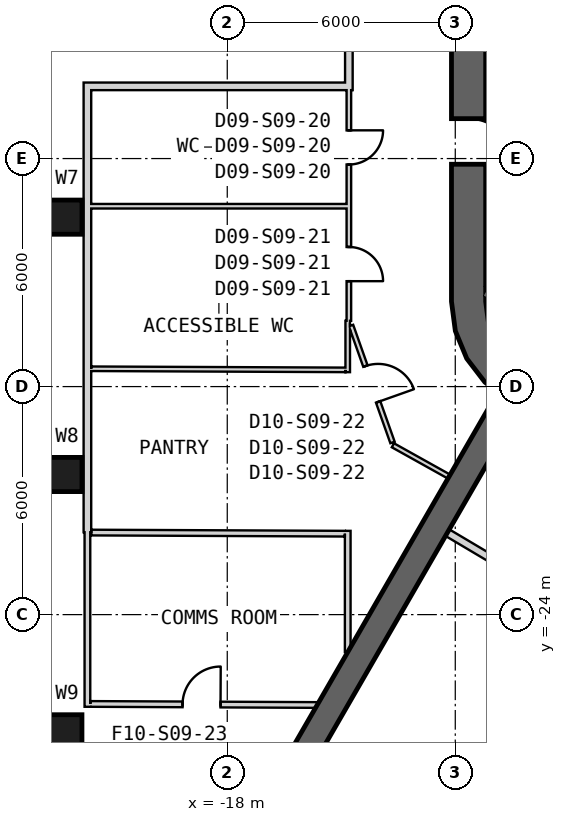
"""IFC4 building model, lengths in metres.
Left out: names, types, materials, properties, quantities, classifications, styles, units other than length and angle.
Written with IfcOpenShell. Run it as: python <this file> out.ifc"""

import sys

from ifc_helpers import new_model, si_unit, direction, frame, frame_2d, origin, origin_2d, place, context, subcontext, project, spatial, polyline, rectangle, outline, extrude, element, fill, save


model = new_model("IFC4")
c1 = context("Model", 3, precision=1e-05, world=origin(), true_north=direction((0.0, 1.0)))
c2 = subcontext(c1, "Body", "Model", "MODEL_VIEW")
j1 = project(units=[si_unit("LENGTHUNIT", "METRE"), si_unit("PLANEANGLEUNIT", "RADIAN")], contexts=[c1])
p1 = place(None, origin())
s1 = spatial("IfcSite", under=j1, at=p1, CompositionType="ELEMENT")
p2 = place(p1, origin())
s2 = spatial("IfcBuilding", under=s1, at=p2, CompositionType="ELEMENT")
p3 = place(p2, frame((0.0, 0.0, 169.2)))
s3 = spatial("IfcBuildingStorey", under=s2, at=p3, CompositionType="ELEMENT", Elevation=169.2)
for number, where, z_axis, x_axis in (
    (1, (-22.524, -13.542, -0.3), (0.0, 0.0, 1.0), (-1.0, 0.0, 0.0)),
    (2, (-22.524, -20.313, -0.3), (0.0, 0.0, 1.0), (-1.0, 0.0, 0.0)),
    (3, (-22.524, -27.084, -0.3), (0.0, 0.0, 1.0), (-1.0, 0.0, 0.0)),
):
    element("IfcColumn", number, at=place(p3, frame(where, z_axis=z_axis, x_axis=x_axis)), inside=s3, PredefinedType="COLUMN", context=c2, shape_type="SweptSolid", body=[
        extrude(rectangle(XDim=1.4, YDim=0.9, at=origin_2d()), origin(), (0.0, 0.0, 1.0), 4.3),
    ])
p4 = place(p3, frame((-11.65, 15.762, 0.0), z_axis=(0.0, 0.0, 1.0), x_axis=(0.0, -1.0, 0.0)))
e4 = element("IfcWall", 4, at=p4, inside=s3, PredefinedType="SHEAR", context=c2, shape_type="SweptSolid", body=[
    extrude(rectangle(XDim=31.523, YDim=0.9, at=frame_2d((15.762, 0.0))), origin(), (0.0, 0.0, 1.0), 4.0),
])
p5 = place(p4, frame((7.062, 0.0, 0.0)))
e5 = element("IfcOpeningElement", 5, at=p5, cuts=e4, PredefinedType="OPENING", context=c2, shape_type="SweptSolid", body=[
    extrude(rectangle(XDim=1.2, YDim=2.4, at=frame_2d((0.6, 1.2))), frame((0.0, 0.46, 0.0), z_axis=(0.0, -1.0, 0.0), x_axis=(1.0, 0.0, 0.0)), (0.0, 0.0, 1.0), 0.92),
])
p6 = place(p4, frame((9.762, 0.0, 0.0)))
e6 = element("IfcOpeningElement", 6, at=p6, cuts=e4, PredefinedType="OPENING", context=c2, shape_type="SweptSolid", body=[
    extrude(rectangle(XDim=1.2, YDim=2.4, at=frame_2d((0.6, 1.2))), frame((0.0, 0.46, 0.0), z_axis=(0.0, -1.0, 0.0), x_axis=(1.0, 0.0, 0.0)), (0.0, 0.0, 1.0), 0.92),
])
p7 = place(p4, frame((12.462, 0.0, 0.0)))
e7 = element("IfcOpeningElement", 7, at=p7, cuts=e4, PredefinedType="OPENING", context=c2, shape_type="SweptSolid", body=[
    extrude(rectangle(XDim=1.2, YDim=2.4, at=frame_2d((0.6, 1.2))), frame((0.0, 0.46, 0.0), z_axis=(0.0, -1.0, 0.0), x_axis=(1.0, 0.0, 0.0)), (0.0, 0.0, 1.0), 0.92),
])
p8 = place(p4, frame((15.162, 0.0, 0.0)))
e8 = element("IfcOpeningElement", 8, at=p8, cuts=e4, PredefinedType="OPENING", context=c2, shape_type="SweptSolid", body=[
    extrude(rectangle(XDim=1.2, YDim=2.4, at=frame_2d((0.6, 1.2))), frame((0.0, 0.46, 0.0), z_axis=(0.0, -1.0, 0.0), x_axis=(1.0, 0.0, 0.0)), (0.0, 0.0, 1.0), 0.92),
])
p9 = place(p4, frame((17.862, 0.0, 0.0)))
e9 = element("IfcOpeningElement", 9, at=p9, cuts=e4, PredefinedType="OPENING", context=c2, shape_type="SweptSolid", body=[
    extrude(rectangle(XDim=1.2, YDim=2.4, at=frame_2d((0.6, 1.2))), frame((0.0, 0.46, 0.0), z_axis=(0.0, -1.0, 0.0), x_axis=(1.0, 0.0, 0.0)), (0.0, 0.0, 1.0), 0.92),
])
p10 = place(p4, frame((20.562, 0.0, 0.0)))
e10 = element("IfcOpeningElement", 10, at=p10, cuts=e4, PredefinedType="OPENING", context=c2, shape_type="SweptSolid", body=[
    extrude(rectangle(XDim=1.2, YDim=2.4, at=frame_2d((0.6, 1.2))), frame((0.0, 0.46, 0.0), z_axis=(0.0, -1.0, 0.0), x_axis=(1.0, 0.0, 0.0)), (0.0, 0.0, 1.0), 0.92),
])
p11 = place(p4, frame((23.262, 0.0, 0.0)))
e11 = element("IfcOpeningElement", 11, at=p11, cuts=e4, PredefinedType="OPENING", context=c2, shape_type="SweptSolid", body=[
    extrude(rectangle(XDim=1.2, YDim=2.4, at=frame_2d((0.6, 1.2))), frame((0.0, 0.46, 0.0), z_axis=(0.0, -1.0, 0.0), x_axis=(1.0, 0.0, 0.0)), (0.0, 0.0, 1.0), 0.92),
])
p12 = place(p4, frame((3.612, 0.0, 0.0)))
e12 = element("IfcOpeningElement", 12, at=p12, cuts=e4, PredefinedType="OPENING", context=c2, shape_type="SweptSolid", body=[
    extrude(rectangle(XDim=1.2, YDim=2.4, at=frame_2d((0.6, 1.2))), frame((0.0, 0.46, 0.0), z_axis=(0.0, -1.0, 0.0), x_axis=(1.0, 0.0, 0.0)), (0.0, 0.0, 1.0), 0.92),
])
p13 = place(p4, frame((26.712, 0.0, 0.0)))
e13 = element("IfcOpeningElement", 13, at=p13, cuts=e4, PredefinedType="OPENING", context=c2, shape_type="SweptSolid", body=[
    extrude(rectangle(XDim=1.2, YDim=2.4, at=frame_2d((0.6, 1.2))), frame((0.0, 0.46, 0.0), z_axis=(0.0, -1.0, 0.0), x_axis=(1.0, 0.0, 0.0)), (0.0, 0.0, 1.0), 0.92),
])
p14 = place(p3, origin())
e14 = element("IfcWall", 14, at=p14, inside=s3, PredefinedType="SHEAR", context=c2, shape_type="SweptSolid", body=[
    extrude(outline(polyline([(-12.1, -15.762), (-11.998, -16.538), (-11.698, -17.262), (-11.221, -17.883), (-10.6, -18.36), (-9.876, -18.659), (-9.1, -18.762), (-8.323, -18.659), (-7.6, -18.36), (-8.05, -17.58), (-8.556, -17.79), (-9.1, -17.862), (-9.644, -17.79), (-10.15, -17.58), (-10.585, -17.247), (-10.919, -16.812), (-11.128, -16.305), (-11.2, -15.762), (-12.1, -15.762)])), origin(), (0.0, 0.0, 1.0), 4.0),
])
p15 = place(p3, frame((-10.575, -18.316, 0.0), z_axis=(0.0, 0.0, 1.0), x_axis=(-0.499995558535, -0.86602796805, 0.0)))
e15 = element("IfcWall", 15, at=p15, inside=s3, PredefinedType="SHEAR", context=c2, shape_type="SweptSolid", body=[
    extrude(rectangle(XDim=12.433, YDim=0.7, at=frame_2d((6.216, 0.0))), origin(), (0.0, 0.0, 1.0), 4.0),
])
p16 = place(p3, frame((-8.05, -9.449, 0.0), z_axis=(0.0, 0.0, 1.0), x_axis=(-0.999957467379, 0.009222983926, 0.0)))
e16 = element("IfcWall", 16, at=p16, inside=s3, PredefinedType="PLUMBINGWALL", context=c2, shape_type="SweptSolid", body=[
    extrude(rectangle(XDim=3.15, YDim=0.2, at=frame_2d((1.575, 0.0))), origin(), (0.0, 0.0, 1.0), 3.7),
])
p17 = place(p3, frame((-11.282, -15.541, -0.3), z_axis=(0.0, 0.0, 1.0), x_axis=(0.866000483506, -0.500043160704, 0.0)))
e17 = element("IfcWall", 17, at=p17, inside=s3, PredefinedType="SHEAR", context=c2, shape_type="SweptSolid", body=[
    extrude(rectangle(XDim=3.8, YDim=0.2, at=frame_2d((1.9, 0.0))), origin(), (0.0, 0.0, 1.0), 4.0),
])
p18 = place(p3, frame((-7.196, -8.663, -0.3), z_axis=(0.0, 0.0, 1.0), x_axis=(-0.499997992926, -0.866026562566, 0.0)))
e18 = element("IfcWall", 18, at=p18, inside=s3, PredefinedType="SHEAR", context=c2, shape_type="SweptSolid", body=[
    extrude(rectangle(XDim=7.9, YDim=0.2, at=frame_2d((3.95, 0.0))), origin(), (0.0, 0.0, 1.0), 4.0),
])
p19 = place(p3, frame((-14.8, -10.13, 0.0), z_axis=(0.0, 0.0, 1.0), x_axis=(0.0, -1.0, 0.0)))
e19 = element("IfcWall", 19, at=p19, inside=s3, PredefinedType="PARTITIONING", context=c2, shape_type="SweptSolid", body=[
    extrude(rectangle(XDim=6.138, YDim=0.12, at=frame_2d((3.069, 0.0))), origin(), (0.0, 0.0, 1.0), 2.88),
])
p20 = place(p19, frame((1.127, 0.0, 0.0)))
e20 = element("IfcOpeningElement", 20, at=p20, cuts=e19, PredefinedType="OPENING", context=c2, shape_type="SweptSolid", body=[
    extrude(rectangle(XDim=0.9, YDim=2.1, at=frame_2d((0.45, 1.05))), frame((0.0, 0.07, 0.0), z_axis=(0.0, -1.0, 0.0), x_axis=(1.0, 0.0, 0.0)), (0.0, 0.0, 1.0), 0.14),
])
p21 = place(p19, frame((4.196, 0.0, 0.0)))
e21 = element("IfcOpeningElement", 21, at=p21, cuts=e19, PredefinedType="OPENING", context=c2, shape_type="SweptSolid", body=[
    extrude(rectangle(XDim=0.9, YDim=2.1, at=frame_2d((0.45, 1.05))), frame((0.0, 0.07, 0.0), z_axis=(0.0, -1.0, 0.0), x_axis=(1.0, 0.0, 0.0)), (0.0, 0.0, 1.0), 0.14),
])
p22 = place(p3, frame((-14.8, -0.07, 0.0), z_axis=(0.0, 0.0, 1.0), x_axis=(0.0, -1.0, 0.0)))
e22 = element("IfcWall", 22, at=p22, inside=s3, PredefinedType="PARTITIONING", context=c2, shape_type="SweptSolid", body=[
    extrude(rectangle(XDim=10.13, YDim=0.2, at=frame_2d((5.065, 0.0))), origin(), (0.0, 0.0, 1.0), 2.98),
])
p23 = place(p3, frame((-13.641, -19.544, 0.0), z_axis=(0.0, 0.0, 1.0), x_axis=(0.873339078614, -0.487112773149, 0.0)))
e23 = element("IfcWall", 23, at=p23, inside=s3, PredefinedType="PARTITIONING", context=c2, shape_type="SweptSolid", body=[
    extrude(rectangle(XDim=1.692, YDim=0.12, at=frame_2d((0.846, 0.0))), origin(), (0.0, 0.0, 1.0), 3.7),
])
p24 = place(p3, frame((-14.743, -16.394, 0.0), z_axis=(0.0, 0.0, 1.0), x_axis=(0.334279115597, -0.942474123186, 0.0)))
e24 = element("IfcWall", 24, at=p24, inside=s3, PredefinedType="PARTITIONING", context=c2, shape_type="SweptSolid", body=[
    extrude(rectangle(XDim=3.264, YDim=0.12, at=frame_2d((1.632, 0.0))), origin(), (0.0, 0.0, 1.0), 2.78),
])
p25 = place(p24, frame((1.132, 0.0, 0.0)))
e25 = element("IfcOpeningElement", 25, at=p25, cuts=e24, PredefinedType="OPENING", context=c2, shape_type="SweptSolid", body=[
    extrude(rectangle(XDim=1.0, YDim=2.1, at=frame_2d((0.5, 1.05))), frame((0.0, 0.07, 0.0), z_axis=(0.0, -1.0, 0.0), x_axis=(1.0, 0.0, 0.0)), (0.0, 0.0, 1.0), 0.14),
])
p26 = place(p3, frame((-12.207, -21.843, 0.0), z_axis=(0.0, 0.0, 1.0), x_axis=(0.859912345357, -0.510441728606, 0.0)))
e26 = element("IfcWall", 26, at=p26, inside=s3, PredefinedType="PARTITIONING", context=c2, shape_type="SweptSolid", body=[
    extrude(rectangle(XDim=2.093, YDim=0.2, at=frame_2d((1.046, 0.0))), origin(), (0.0, 0.0, 1.0), 3.7),
])
p27 = place(p3, frame((-14.9, -10.1, 0.0), z_axis=(0.0, 0.0, 1.0), x_axis=(-1.0, 0.0, 0.0)))
e27 = element("IfcWall", 27, at=p27, inside=s3, PredefinedType="PARTITIONING", context=c2, shape_type="SweptSolid", body=[
    extrude(rectangle(XDim=6.88, YDim=0.2, at=frame_2d((3.44, 0.0))), origin(), (0.0, 0.0, 1.0), 2.98),
])
p28 = place(p3, frame((-21.68, -21.833, 0.0), z_axis=(0.0, 0.0, 1.0), x_axis=(0.0, 1.0, 0.0)))
e28 = element("IfcWall", 28, at=p28, inside=s3, PredefinedType="PARTITIONING", context=c2, shape_type="SweptSolid", body=[
    extrude(rectangle(XDim=4.302, YDim=0.2, at=frame_2d((2.151, 0.0))), origin(), (0.0, 0.0, 1.0), 2.88),
])
p29 = place(p3, frame((-21.68, -17.531, 0.0), z_axis=(0.0, 0.0, 1.0), x_axis=(0.0, 1.0, 0.0)))
e29 = element("IfcWall", 29, at=p29, inside=s3, PredefinedType="PARTITIONING", context=c2, shape_type="SweptSolid", body=[
    extrude(rectangle(XDim=7.331, YDim=0.2, at=frame_2d((3.665, 0.0))), origin(), (0.0, 0.0, 1.0), 2.98),
])
p30 = place(p3, frame((-21.68, -26.425, 0.0), z_axis=(0.0, 0.0, 1.0), x_axis=(0.0, 1.0, 0.0)))
e30 = element("IfcWall", 30, at=p30, inside=s3, PredefinedType="PLUMBINGWALL", context=c2, shape_type="SweptSolid", body=[
    extrude(rectangle(XDim=4.592, YDim=0.15, at=frame_2d((2.296, 0.0))), origin(), (0.0, 0.0, 1.0), 2.78),
])
p31 = place(p3, frame((-21.605, -26.35, 0.0), z_axis=(0.0, 0.0, 1.0), x_axis=(0.999989138364, -0.004660810408, 0.0)))
e31 = element("IfcWall", 31, at=p31, inside=s3, PredefinedType="PLUMBINGWALL", context=c2, shape_type="SweptSolid", body=[
    extrude(rectangle(XDim=5.971, YDim=0.15, at=frame_2d((2.986, 0.0))), origin(), (0.0, 0.0, 1.0), 3.7),
])
p32 = place(p31, frame((2.428, 0.0, 0.0)))
e32 = element("IfcOpeningElement", 32, at=p32, cuts=e31, PredefinedType="OPENING", context=c2, shape_type="SweptSolid", body=[
    extrude(rectangle(XDim=1.0, YDim=2.1, at=frame_2d((0.5, 1.05))), frame((0.0, 0.085, 0.0), z_axis=(0.0, -1.0, 0.0), x_axis=(1.0, 0.0, 0.0)), (0.0, 0.0, 1.0), 0.17),
])
p33 = place(p3, frame((-14.83, -13.254, 0.0), z_axis=(0.0, 0.0, 1.0), x_axis=(-1.0, 0.0, 0.0)))
e33 = element("IfcWall", 33, at=p33, inside=s3, PredefinedType="PARTITIONING", context=c2, shape_type="SweptSolid", body=[
    extrude(rectangle(XDim=6.75, YDim=0.12, at=frame_2d((3.375, 0.0))), origin(), (0.0, 0.0, 1.0), 2.88),
])
p34 = place(p3, frame((-14.83, -17.621, 0.0), z_axis=(0.0, 0.0, 1.0), x_axis=(0.0, 1.0, 0.0)))
e34 = element("IfcWall", 34, at=p34, inside=s3, PredefinedType="PARTITIONING", context=c2, shape_type="SweptSolid", body=[
    extrude(rectangle(XDim=1.352, YDim=0.12, at=frame_2d((0.676, 0.0))), origin(), (0.0, 0.0, 1.0), 2.78),
])
p35 = place(p3, frame((-14.89, -17.56, 0.0), z_axis=(0.0, 0.0, 1.0), x_axis=(-0.999990411956, 0.004379040595, 0.0)))
e35 = element("IfcWall", 35, at=p35, inside=s3, PredefinedType="PARTITIONING", context=c2, shape_type="SweptSolid", body=[
    extrude(rectangle(XDim=6.69, YDim=0.12, at=frame_2d((3.345, 0.0))), origin(), (0.0, 0.0, 1.0), 2.88),
])
p36 = place(p3, frame((-14.83, -24.986, 0.0), z_axis=(0.0, 0.0, 1.0), x_axis=(0.0, 1.0, 0.0)))
e36 = element("IfcWall", 36, at=p36, inside=s3, PredefinedType="PLUMBINGWALL", context=c2, shape_type="SweptSolid", body=[
    extrude(rectangle(XDim=3.191, YDim=0.15, at=frame_2d((1.595, 0.0))), origin(), (0.0, 0.0, 1.0), 3.7),
])
p37 = place(p3, frame((-21.58, -21.841, 0.0), z_axis=(0.0, 0.0, 1.0), x_axis=(0.999990368422, -0.004388970565, 0.0)))
e37 = element("IfcWall", 37, at=p37, inside=s3, PredefinedType="PLUMBINGWALL", context=c2, shape_type="SweptSolid", body=[
    extrude(rectangle(XDim=6.675, YDim=0.15, at=frame_2d((3.337, 0.0))), origin(), (0.0, 0.0, 1.0), 2.78),
])
p38 = place(p20, origin())
e38 = element("IfcDoor", 38, at=p38, inside=s3, OperationType="SINGLE_SWING_LEFT", PredefinedType="NOTDEFINED", context=c2, shape_type="SweptSolid", body=[
    extrude(rectangle(XDim=0.9, YDim=2.1, at=frame_2d((0.45, 1.05))), frame((0.0, 0.025, 0.0), z_axis=(0.0, -1.0, 0.0), x_axis=(1.0, 0.0, 0.0)), (0.0, 0.0, 1.0), 0.05),
])
fill(e20, e38)
p39 = place(p21, origin())
e39 = element("IfcDoor", 39, at=p39, inside=s3, OperationType="SINGLE_SWING_RIGHT", PredefinedType="NOTDEFINED", context=c2, shape_type="SweptSolid", body=[
    extrude(rectangle(XDim=0.9, YDim=2.1, at=frame_2d((0.45, 1.05))), frame((0.0, 0.025, 0.0), z_axis=(0.0, -1.0, 0.0), x_axis=(1.0, 0.0, 0.0)), (0.0, 0.0, 1.0), 0.05),
])
fill(e21, e39)
p40 = place(p25, origin())
e40 = element("IfcDoor", 40, at=p40, inside=s3, OperationType="SINGLE_SWING_RIGHT", PredefinedType="NOTDEFINED", context=c2, shape_type="SweptSolid", body=[
    extrude(rectangle(XDim=1.0, YDim=2.1, at=frame_2d((0.5, 1.05))), frame((0.0, 0.025, 0.0), z_axis=(0.0, -1.0, 0.0), x_axis=(1.0, 0.0, 0.0)), (0.0, 0.0, 1.0), 0.05),
])
fill(e25, e40)
p41 = place(p32, origin())
e41 = element("IfcDoor", 41, at=p41, inside=s3, OperationType="SINGLE_SWING_LEFT", PredefinedType="USERDEFINED", context=c2, shape_type="SweptSolid", body=[
    extrude(rectangle(XDim=1.0, YDim=2.1, at=frame_2d((0.5, 1.05))), frame((0.0, 0.025, 0.0), z_axis=(0.0, -1.0, 0.0), x_axis=(1.0, 0.0, 0.0)), (0.0, 0.0, 1.0), 0.05),
])
fill(e32, e41)
p42 = place(p13, origin())
e42 = element("IfcDoor", 42, at=p42, inside=s3, OperationType="SINGLE_SWING_RIGHT", PredefinedType="USERDEFINED", context=c2, shape_type="SweptSolid", body=[
    extrude(rectangle(XDim=1.2, YDim=2.4, at=frame_2d((0.6, 1.2))), frame((0.0, 0.025, 0.0), z_axis=(0.0, -1.0, 0.0), x_axis=(1.0, 0.0, 0.0)), (0.0, 0.0, 1.0), 0.05),
])
fill(e13, e42)
save(model, sys.argv[1])
